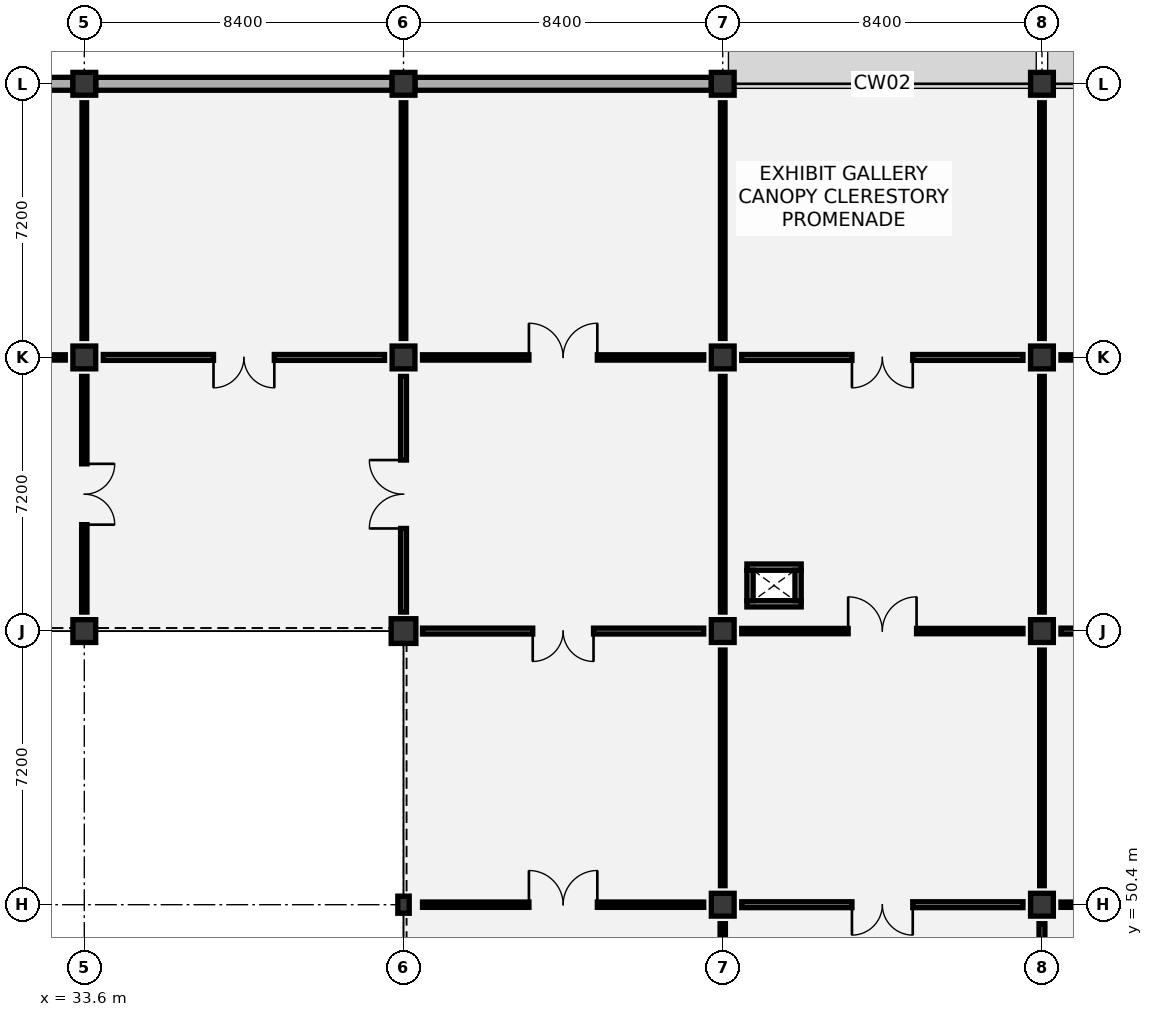
"""IFC4 building model, lengths in metres.
Left out: names, types, materials, properties, quantities, classifications, styles, units other than length and angle.
Written with IfcOpenShell. Run it as: python <this file> out.ifc"""

import sys

from ifc_helpers import new_model, si_unit, direction, frame, frame_2d, origin, origin_2d, place, context, subcontext, project, spatial, rectangle, i_section, extrude, element, fill, save


model = new_model("IFC4")
c1 = context("Model", 3, precision=1e-05, world=origin(), true_north=direction((0.0, 1.0)))
c2 = subcontext(c1, "Body", "Model", "MODEL_VIEW")
j1 = project(units=[si_unit("LENGTHUNIT", "METRE"), si_unit("PLANEANGLEUNIT", "RADIAN")], contexts=[c1])
p1 = place(None, origin())
s1 = spatial("IfcSite", under=j1, at=p1, CompositionType="ELEMENT")
p2 = place(p1, origin())
s2 = spatial("IfcBuilding", under=s1, at=p2, CompositionType="ELEMENT")
p3 = place(p2, frame((0.0, 0.0, 16.8)))
s3 = spatial("IfcBuildingStorey", under=s2, at=p3, CompositionType="ELEMENT", Elevation=16.8)
for number, where, z_axis, x_axis in (
    (1, (33.6, 57.6, 0.0), (0.0, 0.0, 1.0), (1.0, 0.0, 0.0)),
    (2, (33.6, 64.8, 0.0), (0.0, 0.0, 1.0), (1.0, 0.0, 0.0)),
    (3, (33.6, 72.0, 0.0), (0.0, 0.0, 1.0), (1.0, 0.0, 0.0)),
):
    element("IfcColumn", number, at=place(p3, frame(where, z_axis=z_axis, x_axis=x_axis)), inside=s3, PredefinedType="COLUMN", context=c2, shape_type="SweptSolid", body=[
        extrude(rectangle(XDim=0.6, YDim=0.6, at=origin_2d()), origin(), (0.0, 0.0, 1.0), 5.05),
    ])
p4 = place(p3, frame((42.0, 50.4, 0.0), z_axis=(0.0, 0.0, 1.0), x_axis=(1.0, 0.0, 0.0)))
e4 = element("IfcColumn", 4, at=p4, inside=s3, PredefinedType="COLUMN", context=c2, shape_type="SweptSolid", body=[
    extrude(i_section(OverallWidth=0.3, OverallDepth=0.45, WebThickness=0.014, FlangeThickness=0.026, FilletRadius=0.027, at=origin_2d()), origin(), (0.0, 0.0, 1.0), 5.4),
])
p5 = place(p3, frame((42.0, 57.6, 0.0), z_axis=(0.0, 0.0, 1.0), x_axis=(1.0, 0.0, 0.0)))
e5 = element("IfcColumn", 5, at=p5, inside=s3, PredefinedType="COLUMN", context=c2, shape_type="SweptSolid", body=[
    extrude(rectangle(XDim=0.65, YDim=0.65, at=origin_2d()), origin(), (0.0, 0.0, 1.0), 5.4),
])
for number, where, z_axis, x_axis in (
    (6, (42.0, 64.8, 0.0), (0.0, 0.0, 1.0), (1.0, 0.0, 0.0)),
    (7, (42.0, 72.0, 0.0), (0.0, 0.0, 1.0), (1.0, 0.0, 0.0)),
    (8, (50.4, 50.4, 0.0), (0.0, 0.0, 1.0), (1.0, 0.0, 0.0)),
    (9, (50.4, 57.6, 0.0), (0.0, 0.0, 1.0), (1.0, 0.0, 0.0)),
    (10, (50.4, 64.8, 0.0), (0.0, 0.0, 1.0), (1.0, 0.0, 0.0)),
    (11, (50.4, 72.0, 0.0), (0.0, 0.0, 1.0), (1.0, 0.0, 0.0)),
    (12, (58.8, 50.4, 0.0), (0.0, 0.0, 1.0), (1.0, 0.0, 0.0)),
    (13, (58.8, 57.6, 0.0), (0.0, 0.0, 1.0), (1.0, 0.0, 0.0)),
    (14, (58.8, 64.8, 0.0), (0.0, 0.0, 1.0), (1.0, 0.0, 0.0)),
    (15, (58.8, 72.0, 0.0), (0.0, 0.0, 1.0), (1.0, 0.0, 0.0)),
):
    element("IfcColumn", number, at=place(p3, frame(where, z_axis=z_axis, x_axis=x_axis)), inside=s3, PredefinedType="COLUMN", context=c2, shape_type="SweptSolid", body=[
        extrude(rectangle(XDim=0.6, YDim=0.6, at=origin_2d()), origin(), (0.0, 0.0, 1.0), 5.05),
    ])
for number, where, z_axis, x_axis in (
    (16, (25.5, 72.0, 0.0), (0.0, 0.0, 1.0), (1.0, 0.0, 0.0)),
    (17, (33.9, 72.0, 0.0), (0.0, 0.0, 1.0), (1.0, 0.0, 0.0)),
    (18, (42.3, 72.0, 0.0), (0.0, 0.0, 1.0), (1.0, 0.0, 0.0)),
):
    element("IfcWall", number, at=place(p3, frame(where, z_axis=z_axis, x_axis=x_axis)), inside=s3, PredefinedType="SOLIDWALL", context=c2, shape_type="SweptSolid", body=[
        extrude(rectangle(XDim=7.8, YDim=0.34, at=frame_2d((3.9, 0.0))), origin(), (0.0, 0.0, 1.0), 4.17),
    ])
for number, where, z_axis, x_axis in (
    (19, (51.035, 58.317, 0.0), (0.0, 0.0, 1.0), (1.0, 0.0, 0.0)),
    (20, (51.035, 59.282, 0.0), (0.0, 0.0, 1.0), (1.0, 0.0, 0.0)),
):
    element("IfcWall", number, at=place(p3, frame(where, z_axis=z_axis, x_axis=x_axis)), inside=s3, PredefinedType="PARTITIONING", context=c2, shape_type="SweptSolid", body=[
        extrude(rectangle(XDim=1.43, YDim=0.165, at=frame_2d((0.715, 0.0))), origin(), (0.0, 0.0, 1.0), 4.825),
    ])
for number, where, z_axis, x_axis in (
    (21, (51.117, 58.4, 0.0), (0.0, 0.0, 1.0), (0.0, 1.0, 0.0)),
    (22, (52.383, 58.4, 0.0), (0.0, 0.0, 1.0), (0.0, 1.0, 0.0)),
):
    element("IfcWall", number, at=place(p3, frame(where, z_axis=z_axis, x_axis=x_axis)), inside=s3, PredefinedType="PARTITIONING", context=c2, shape_type="SweptSolid", body=[
        extrude(rectangle(XDim=0.8, YDim=0.165, at=frame_2d((0.4, 0.0))), origin(), (0.0, 0.0, 1.0), 4.825),
    ])
p6 = place(p3, frame((33.6, 58.1, 0.0), z_axis=(0.0, 0.0, 1.0), x_axis=(0.0, 1.0, 0.0)))
e23 = element("IfcWall", 23, at=p6, inside=s3, PredefinedType="PARTITIONING", context=c2, shape_type="SweptSolid", body=[
    extrude(rectangle(XDim=6.2, YDim=0.14, at=frame_2d((3.1, 0.0))), origin(), (0.0, 0.0, 1.0), 4.12),
])
p7 = place(p6, frame((2.3, 0.0, 0.0)))
e24 = element("IfcOpeningElement", 24, at=p7, cuts=e23, PredefinedType="OPENING", context=c2, shape_type="SweptSolid", body=[
    extrude(rectangle(XDim=1.6, YDim=2.2, at=frame_2d((0.8, 1.1))), frame((0.0, 0.08, 0.0), z_axis=(0.0, -1.0, 0.0), x_axis=(1.0, 0.0, 0.0)), (0.0, 0.0, 1.0), 0.16),
])
p8 = place(p3, frame((25.7, 64.8, 0.0), z_axis=(0.0, 0.0, 1.0), x_axis=(1.0, 0.0, 0.0)))
e25 = element("IfcWall", 25, at=p8, inside=s3, PredefinedType="PARTITIONING", context=c2, shape_type="SweptSolid", body=[
    extrude(rectangle(XDim=7.4, YDim=0.14, at=frame_2d((3.7, 0.0))), origin(), (0.0, 0.0, 1.0), 4.07),
])
p9 = place(p8, frame((2.8, 0.0, 0.0)))
e26 = element("IfcOpeningElement", 26, at=p9, cuts=e25, PredefinedType="OPENING", context=c2, shape_type="SweptSolid", body=[
    extrude(rectangle(XDim=1.8, YDim=2.25, at=frame_2d((0.9, 1.125))), frame((0.0, 0.08, 0.0), z_axis=(0.0, -1.0, 0.0), x_axis=(1.0, 0.0, 0.0)), (0.0, 0.0, 1.0), 0.16),
])
p10 = place(p3, frame((33.6, 65.3, 0.0), z_axis=(0.0, 0.0, 1.0), x_axis=(0.0, 1.0, 0.0)))
e27 = element("IfcWall", 27, at=p10, inside=s3, PredefinedType="PARTITIONING", context=c2, shape_type="SweptSolid", body=[
    extrude(rectangle(XDim=6.2, YDim=0.12, at=frame_2d((3.1, 0.0))), origin(), (0.0, 0.0, 1.0), 4.32),
])
p11 = place(p3, frame((42.0, 58.1, 0.0), z_axis=(0.0, 0.0, 1.0), x_axis=(0.0, 1.0, 0.0)))
e28 = element("IfcWall", 28, at=p11, inside=s3, PredefinedType="PARTITIONING", context=c2, shape_type="SweptSolid", body=[
    extrude(rectangle(XDim=6.2, YDim=0.155, at=frame_2d((3.1, 0.0))), origin(), (0.0, 0.0, 1.0), 4.32),
])
p12 = place(p11, frame((2.2, 0.0, 0.0)))
e29 = element("IfcOpeningElement", 29, at=p12, cuts=e28, PredefinedType="OPENING", context=c2, shape_type="SweptSolid", body=[
    extrude(rectangle(XDim=1.8, YDim=2.25, at=frame_2d((0.9, 1.125))), frame((0.0, 0.087, 0.0), z_axis=(0.0, -1.0, 0.0), x_axis=(1.0, 0.0, 0.0)), (0.0, 0.0, 1.0), 0.175),
])
p13 = place(p3, frame((34.1, 64.8, 0.0), z_axis=(0.0, 0.0, 1.0), x_axis=(1.0, 0.0, 0.0)))
e30 = element("IfcWall", 30, at=p13, inside=s3, PredefinedType="PARTITIONING", context=c2, shape_type="SweptSolid", body=[
    extrude(rectangle(XDim=7.4, YDim=0.155, at=frame_2d((3.7, 0.0))), origin(), (0.0, 0.0, 1.0), 4.07),
])
p14 = place(p13, frame((2.9, 0.0, 0.0)))
e31 = element("IfcOpeningElement", 31, at=p14, cuts=e30, PredefinedType="OPENING", context=c2, shape_type="SweptSolid", body=[
    extrude(rectangle(XDim=1.6, YDim=2.2, at=frame_2d((0.8, 1.1))), frame((0.0, 0.087, 0.0), z_axis=(0.0, -1.0, 0.0), x_axis=(1.0, 0.0, 0.0)), (0.0, 0.0, 1.0), 0.175),
])
p15 = place(p3, frame((42.0, 65.3, 0.0), z_axis=(0.0, 0.0, 1.0), x_axis=(0.0, 1.0, 0.0)))
e32 = element("IfcWall", 32, at=p15, inside=s3, PredefinedType="PARTITIONING", context=c2, shape_type="SweptSolid", body=[
    extrude(rectangle(XDim=6.2, YDim=0.12, at=frame_2d((3.1, 0.0))), origin(), (0.0, 0.0, 1.0), 4.12),
])
p16 = place(p3, frame((50.4, 43.7, 0.0), z_axis=(0.0, 0.0, 1.0), x_axis=(0.0, 1.0, 0.0)))
e33 = element("IfcWall", 33, at=p16, inside=s3, PredefinedType="PARTITIONING", context=c2, shape_type="SweptSolid", body=[
    extrude(rectangle(XDim=6.2, YDim=0.14, at=frame_2d((3.1, 0.0))), origin(), (0.0, 0.0, 1.0), 4.12),
])
p17 = place(p16, frame((2.3, 0.0, 0.0)))
e34 = element("IfcOpeningElement", 34, at=p17, cuts=e33, PredefinedType="OPENING", context=c2, shape_type="SweptSolid", body=[
    extrude(rectangle(XDim=1.6, YDim=2.2, at=frame_2d((0.8, 1.1))), frame((0.0, 0.08, 0.0), z_axis=(0.0, -1.0, 0.0), x_axis=(1.0, 0.0, 0.0)), (0.0, 0.0, 1.0), 0.16),
])
p18 = place(p3, frame((42.5, 50.4, 0.0), z_axis=(0.0, 0.0, 1.0), x_axis=(1.0, 0.0, 0.0)))
e35 = element("IfcWall", 35, at=p18, inside=s3, PredefinedType="PARTITIONING", context=c2, shape_type="SweptSolid", body=[
    extrude(rectangle(XDim=7.4, YDim=0.14, at=frame_2d((3.7, 0.0))), origin(), (0.0, 0.0, 1.0), 4.07),
])
p19 = place(p18, frame((2.8, 0.0, 0.0)))
e36 = element("IfcOpeningElement", 36, at=p19, cuts=e35, PredefinedType="OPENING", context=c2, shape_type="SweptSolid", body=[
    extrude(rectangle(XDim=1.8, YDim=2.25, at=frame_2d((0.9, 1.125))), frame((0.0, 0.08, 0.0), z_axis=(0.0, -1.0, 0.0), x_axis=(1.0, 0.0, 0.0)), (0.0, 0.0, 1.0), 0.16),
])
p20 = place(p3, frame((50.4, 50.9, 0.0), z_axis=(0.0, 0.0, 1.0), x_axis=(0.0, 1.0, 0.0)))
e37 = element("IfcWall", 37, at=p20, inside=s3, PredefinedType="PARTITIONING", context=c2, shape_type="SweptSolid", body=[
    extrude(rectangle(XDim=6.2, YDim=0.12, at=frame_2d((3.1, 0.0))), origin(), (0.0, 0.0, 1.0), 4.32),
])
p21 = place(p3, frame((42.5, 57.6, 0.0), z_axis=(0.0, 0.0, 1.0), x_axis=(1.0, 0.0, 0.0)))
e38 = element("IfcWall", 38, at=p21, inside=s3, PredefinedType="PARTITIONING", context=c2, shape_type="SweptSolid", body=[
    extrude(rectangle(XDim=7.4, YDim=0.155, at=frame_2d((3.7, 0.0))), origin(), (0.0, 0.0, 1.0), 4.07),
])
p22 = place(p21, frame((2.9, 0.0, 0.0)))
e39 = element("IfcOpeningElement", 39, at=p22, cuts=e38, PredefinedType="OPENING", context=c2, shape_type="SweptSolid", body=[
    extrude(rectangle(XDim=1.6, YDim=2.2, at=frame_2d((0.8, 1.1))), frame((0.0, 0.087, 0.0), z_axis=(0.0, -1.0, 0.0), x_axis=(1.0, 0.0, 0.0)), (0.0, 0.0, 1.0), 0.175),
])
p23 = place(p3, frame((50.4, 58.1, 0.0), z_axis=(0.0, 0.0, 1.0), x_axis=(0.0, 1.0, 0.0)))
e40 = element("IfcWall", 40, at=p23, inside=s3, PredefinedType="PARTITIONING", context=c2, shape_type="SweptSolid", body=[
    extrude(rectangle(XDim=6.2, YDim=0.12, at=frame_2d((3.1, 0.0))), origin(), (0.0, 0.0, 1.0), 4.12),
])
p24 = place(p3, frame((42.5, 64.8, 0.0), z_axis=(0.0, 0.0, 1.0), x_axis=(1.0, 0.0, 0.0)))
e41 = element("IfcWall", 41, at=p24, inside=s3, PredefinedType="PARTITIONING", context=c2, shape_type="SweptSolid", body=[
    extrude(rectangle(XDim=7.4, YDim=0.14, at=frame_2d((3.7, 0.0))), origin(), (0.0, 0.0, 1.0), 4.07),
])
p25 = place(p24, frame((2.8, 0.0, 0.0)))
e42 = element("IfcOpeningElement", 42, at=p25, cuts=e41, PredefinedType="OPENING", context=c2, shape_type="SweptSolid", body=[
    extrude(rectangle(XDim=1.8, YDim=2.25, at=frame_2d((0.9, 1.125))), frame((0.0, 0.08, 0.0), z_axis=(0.0, -1.0, 0.0), x_axis=(1.0, 0.0, 0.0)), (0.0, 0.0, 1.0), 0.16),
])
p26 = place(p3, frame((50.4, 65.3, 0.0), z_axis=(0.0, 0.0, 1.0), x_axis=(0.0, 1.0, 0.0)))
e43 = element("IfcWall", 43, at=p26, inside=s3, PredefinedType="PARTITIONING", context=c2, shape_type="SweptSolid", body=[
    extrude(rectangle(XDim=6.2, YDim=0.12, at=frame_2d((3.1, 0.0))), origin(), (0.0, 0.0, 1.0), 4.42),
])
p27 = place(p3, frame((58.8, 43.7, 0.0), z_axis=(0.0, 0.0, 1.0), x_axis=(0.0, 1.0, 0.0)))
e44 = element("IfcWall", 44, at=p27, inside=s3, PredefinedType="PARTITIONING", context=c2, shape_type="SweptSolid", body=[
    extrude(rectangle(XDim=6.2, YDim=0.155, at=frame_2d((3.1, 0.0))), origin(), (0.0, 0.0, 1.0), 4.32),
])
p28 = place(p27, frame((2.2, 0.0, 0.0)))
e45 = element("IfcOpeningElement", 45, at=p28, cuts=e44, PredefinedType="OPENING", context=c2, shape_type="SweptSolid", body=[
    extrude(rectangle(XDim=1.8, YDim=2.25, at=frame_2d((0.9, 1.125))), frame((0.0, 0.087, 0.0), z_axis=(0.0, -1.0, 0.0), x_axis=(1.0, 0.0, 0.0)), (0.0, 0.0, 1.0), 0.175),
])
p29 = place(p3, frame((50.9, 50.4, 0.0), z_axis=(0.0, 0.0, 1.0), x_axis=(1.0, 0.0, 0.0)))
e46 = element("IfcWall", 46, at=p29, inside=s3, PredefinedType="PARTITIONING", context=c2, shape_type="SweptSolid", body=[
    extrude(rectangle(XDim=7.4, YDim=0.155, at=frame_2d((3.7, 0.0))), origin(), (0.0, 0.0, 1.0), 4.07),
])
p30 = place(p29, frame((2.9, 0.0, 0.0)))
e47 = element("IfcOpeningElement", 47, at=p30, cuts=e46, PredefinedType="OPENING", context=c2, shape_type="SweptSolid", body=[
    extrude(rectangle(XDim=1.6, YDim=2.2, at=frame_2d((0.8, 1.1))), frame((0.0, 0.087, 0.0), z_axis=(0.0, -1.0, 0.0), x_axis=(1.0, 0.0, 0.0)), (0.0, 0.0, 1.0), 0.175),
])
p31 = place(p3, frame((58.8, 50.9, 0.0), z_axis=(0.0, 0.0, 1.0), x_axis=(0.0, 1.0, 0.0)))
e48 = element("IfcWall", 48, at=p31, inside=s3, PredefinedType="PARTITIONING", context=c2, shape_type="SweptSolid", body=[
    extrude(rectangle(XDim=6.2, YDim=0.12, at=frame_2d((3.1, 0.0))), origin(), (0.0, 0.0, 1.0), 4.12),
])
p32 = place(p3, frame((50.9, 57.6, 0.0), z_axis=(0.0, 0.0, 1.0), x_axis=(1.0, 0.0, 0.0)))
e49 = element("IfcWall", 49, at=p32, inside=s3, PredefinedType="PARTITIONING", context=c2, shape_type="SweptSolid", body=[
    extrude(rectangle(XDim=7.4, YDim=0.14, at=frame_2d((3.7, 0.0))), origin(), (0.0, 0.0, 1.0), 4.07),
])
p33 = place(p32, frame((2.8, 0.0, 0.0)))
e50 = element("IfcOpeningElement", 50, at=p33, cuts=e49, PredefinedType="OPENING", context=c2, shape_type="SweptSolid", body=[
    extrude(rectangle(XDim=1.8, YDim=2.25, at=frame_2d((0.9, 1.125))), frame((0.0, 0.08, 0.0), z_axis=(0.0, -1.0, 0.0), x_axis=(1.0, 0.0, 0.0)), (0.0, 0.0, 1.0), 0.16),
])
p34 = place(p3, frame((58.8, 58.1, 0.0), z_axis=(0.0, 0.0, 1.0), x_axis=(0.0, 1.0, 0.0)))
e51 = element("IfcWall", 51, at=p34, inside=s3, PredefinedType="PARTITIONING", context=c2, shape_type="SweptSolid", body=[
    extrude(rectangle(XDim=6.2, YDim=0.12, at=frame_2d((3.1, 0.0))), origin(), (0.0, 0.0, 1.0), 4.42),
])
p35 = place(p3, frame((50.9, 64.8, 0.0), z_axis=(0.0, 0.0, 1.0), x_axis=(1.0, 0.0, 0.0)))
e52 = element("IfcWall", 52, at=p35, inside=s3, PredefinedType="PARTITIONING", context=c2, shape_type="SweptSolid", body=[
    extrude(rectangle(XDim=7.4, YDim=0.155, at=frame_2d((3.7, 0.0))), origin(), (0.0, 0.0, 1.0), 4.07),
])
p36 = place(p35, frame((2.9, 0.0, 0.0)))
e53 = element("IfcOpeningElement", 53, at=p36, cuts=e52, PredefinedType="OPENING", context=c2, shape_type="SweptSolid", body=[
    extrude(rectangle(XDim=1.6, YDim=2.2, at=frame_2d((0.8, 1.1))), frame((0.0, 0.087, 0.0), z_axis=(0.0, -1.0, 0.0), x_axis=(1.0, 0.0, 0.0)), (0.0, 0.0, 1.0), 0.175),
])
p37 = place(p3, frame((58.8, 65.3, 0.0), z_axis=(0.0, 0.0, 1.0), x_axis=(0.0, 1.0, 0.0)))
e54 = element("IfcWall", 54, at=p37, inside=s3, PredefinedType="PARTITIONING", context=c2, shape_type="SweptSolid", body=[
    extrude(rectangle(XDim=6.2, YDim=0.12, at=frame_2d((3.1, 0.0))), origin(), (0.0, 0.0, 1.0), 4.12),
])
p38 = place(p3, frame((59.3, 50.4, 0.0), z_axis=(0.0, 0.0, 1.0), x_axis=(1.0, 0.0, 0.0)))
e55 = element("IfcWall", 55, at=p38, inside=s3, PredefinedType="PARTITIONING", context=c2, shape_type="SweptSolid", body=[
    extrude(rectangle(XDim=7.4, YDim=0.14, at=frame_2d((3.7, 0.0))), origin(), (0.0, 0.0, 1.0), 4.07),
])
p39 = place(p38, frame((2.8, 0.0, 0.0)))
e56 = element("IfcOpeningElement", 56, at=p39, cuts=e55, PredefinedType="OPENING", context=c2, shape_type="SweptSolid", body=[
    extrude(rectangle(XDim=1.8, YDim=2.25, at=frame_2d((0.9, 1.125))), frame((0.0, 0.08, 0.0), z_axis=(0.0, -1.0, 0.0), x_axis=(1.0, 0.0, 0.0)), (0.0, 0.0, 1.0), 0.16),
])
p40 = place(p3, frame((59.3, 57.6, 0.0), z_axis=(0.0, 0.0, 1.0), x_axis=(1.0, 0.0, 0.0)))
e57 = element("IfcWall", 57, at=p40, inside=s3, PredefinedType="PARTITIONING", context=c2, shape_type="SweptSolid", body=[
    extrude(rectangle(XDim=7.4, YDim=0.155, at=frame_2d((3.7, 0.0))), origin(), (0.0, 0.0, 1.0), 4.07),
])
p41 = place(p40, frame((2.9, 0.0, 0.0)))
e58 = element("IfcOpeningElement", 58, at=p41, cuts=e57, PredefinedType="OPENING", context=c2, shape_type="SweptSolid", body=[
    extrude(rectangle(XDim=1.6, YDim=2.2, at=frame_2d((0.8, 1.1))), frame((0.0, 0.087, 0.0), z_axis=(0.0, -1.0, 0.0), x_axis=(1.0, 0.0, 0.0)), (0.0, 0.0, 1.0), 0.175),
])
p42 = place(p3, frame((59.3, 64.8, 0.0), z_axis=(0.0, 0.0, 1.0), x_axis=(1.0, 0.0, 0.0)))
e59 = element("IfcWall", 59, at=p42, inside=s3, PredefinedType="PARTITIONING", context=c2, shape_type="SweptSolid", body=[
    extrude(rectangle(XDim=7.4, YDim=0.14, at=frame_2d((3.7, 0.0))), origin(), (0.0, 0.0, 1.0), 4.07),
])
p43 = place(p42, frame((2.9, 0.0, 0.0)))
e60 = element("IfcOpeningElement", 60, at=p43, cuts=e59, PredefinedType="OPENING", context=c2, shape_type="SweptSolid", body=[
    extrude(rectangle(XDim=1.6, YDim=2.2, at=frame_2d((0.8, 1.1))), frame((0.0, 0.08, 0.0), z_axis=(0.0, -1.0, 0.0), x_axis=(1.0, 0.0, 0.0)), (0.0, 0.0, 1.0), 0.16),
])
p44 = place(p7, frame((1.6, 0.0, 0.0), z_axis=(0.0, 0.0, 1.0), x_axis=(-1.0, 0.0, 0.0)))
e61 = element("IfcDoor", 61, at=p44, inside=s3, OperationType="DOUBLE_DOOR_SINGLE_SWING", PredefinedType="DOOR", context=c2, shape_type="SweptSolid", body=[
    extrude(rectangle(XDim=1.6, YDim=2.2, at=frame_2d((0.8, 1.1))), frame((0.0, 0.025, 0.0), z_axis=(0.0, -1.0, 0.0), x_axis=(1.0, 0.0, 0.0)), (0.0, 0.0, 1.0), 0.05),
])
fill(e24, e61)
p45 = place(p12, origin())
e62 = element("IfcDoor", 62, at=p45, inside=s3, OperationType="DOUBLE_DOOR_SINGLE_SWING", PredefinedType="DOOR", context=c2, shape_type="SweptSolid", body=[
    extrude(rectangle(XDim=1.8, YDim=2.25, at=frame_2d((0.9, 1.125))), frame((0.0, 0.025, 0.0), z_axis=(0.0, -1.0, 0.0), x_axis=(1.0, 0.0, 0.0)), (0.0, 0.0, 1.0), 0.05),
])
fill(e29, e62)
p46 = place(p14, frame((1.6, 0.0, 0.0), z_axis=(0.0, 0.0, 1.0), x_axis=(-1.0, 0.0, 0.0)))
e63 = element("IfcDoor", 63, at=p46, inside=s3, OperationType="DOUBLE_DOOR_SINGLE_SWING", PredefinedType="DOOR", context=c2, shape_type="SweptSolid", body=[
    extrude(rectangle(XDim=1.6, YDim=2.2, at=frame_2d((0.8, 1.1))), frame((0.0, 0.025, 0.0), z_axis=(0.0, -1.0, 0.0), x_axis=(1.0, 0.0, 0.0)), (0.0, 0.0, 1.0), 0.05),
])
fill(e31, e63)
p47 = place(p19, origin())
e64 = element("IfcDoor", 64, at=p47, inside=s3, OperationType="DOUBLE_DOOR_SINGLE_SWING", PredefinedType="DOOR", context=c2, shape_type="SweptSolid", body=[
    extrude(rectangle(XDim=1.8, YDim=2.25, at=frame_2d((0.9, 1.125))), frame((0.0, 0.025, 0.0), z_axis=(0.0, -1.0, 0.0), x_axis=(1.0, 0.0, 0.0)), (0.0, 0.0, 1.0), 0.05),
])
fill(e36, e64)
p48 = place(p22, frame((1.6, 0.0, 0.0), z_axis=(0.0, 0.0, 1.0), x_axis=(-1.0, 0.0, 0.0)))
e65 = element("IfcDoor", 65, at=p48, inside=s3, OperationType="DOUBLE_DOOR_SINGLE_SWING", PredefinedType="DOOR", context=c2, shape_type="SweptSolid", body=[
    extrude(rectangle(XDim=1.6, YDim=2.2, at=frame_2d((0.8, 1.1))), frame((0.0, 0.025, 0.0), z_axis=(0.0, -1.0, 0.0), x_axis=(1.0, 0.0, 0.0)), (0.0, 0.0, 1.0), 0.05),
])
fill(e39, e65)
p49 = place(p25, origin())
e66 = element("IfcDoor", 66, at=p49, inside=s3, OperationType="DOUBLE_DOOR_SINGLE_SWING", PredefinedType="DOOR", context=c2, shape_type="SweptSolid", body=[
    extrude(rectangle(XDim=1.8, YDim=2.25, at=frame_2d((0.9, 1.125))), frame((0.0, 0.025, 0.0), z_axis=(0.0, -1.0, 0.0), x_axis=(1.0, 0.0, 0.0)), (0.0, 0.0, 1.0), 0.05),
])
fill(e42, e66)
p50 = place(p30, frame((1.6, 0.0, 0.0), z_axis=(0.0, 0.0, 1.0), x_axis=(-1.0, 0.0, 0.0)))
e67 = element("IfcDoor", 67, at=p50, inside=s3, OperationType="DOUBLE_DOOR_SINGLE_SWING", PredefinedType="DOOR", context=c2, shape_type="SweptSolid", body=[
    extrude(rectangle(XDim=1.6, YDim=2.2, at=frame_2d((0.8, 1.1))), frame((0.0, 0.025, 0.0), z_axis=(0.0, -1.0, 0.0), x_axis=(1.0, 0.0, 0.0)), (0.0, 0.0, 1.0), 0.05),
])
fill(e47, e67)
p51 = place(p33, origin())
e68 = element("IfcDoor", 68, at=p51, inside=s3, OperationType="DOUBLE_DOOR_SINGLE_SWING", PredefinedType="DOOR", context=c2, shape_type="SweptSolid", body=[
    extrude(rectangle(XDim=1.8, YDim=2.25, at=frame_2d((0.9, 1.125))), frame((0.0, 0.025, 0.0), z_axis=(0.0, -1.0, 0.0), x_axis=(1.0, 0.0, 0.0)), (0.0, 0.0, 1.0), 0.05),
])
fill(e50, e68)
p52 = place(p36, frame((1.6, 0.0, 0.0), z_axis=(0.0, 0.0, 1.0), x_axis=(-1.0, 0.0, 0.0)))
e69 = element("IfcDoor", 69, at=p52, inside=s3, OperationType="DOUBLE_DOOR_SINGLE_SWING", PredefinedType="DOOR", context=c2, shape_type="SweptSolid", body=[
    extrude(rectangle(XDim=1.6, YDim=2.2, at=frame_2d((0.8, 1.1))), frame((0.0, 0.025, 0.0), z_axis=(0.0, -1.0, 0.0), x_axis=(1.0, 0.0, 0.0)), (0.0, 0.0, 1.0), 0.05),
])
fill(e53, e69)
save(model, sys.argv[1])
